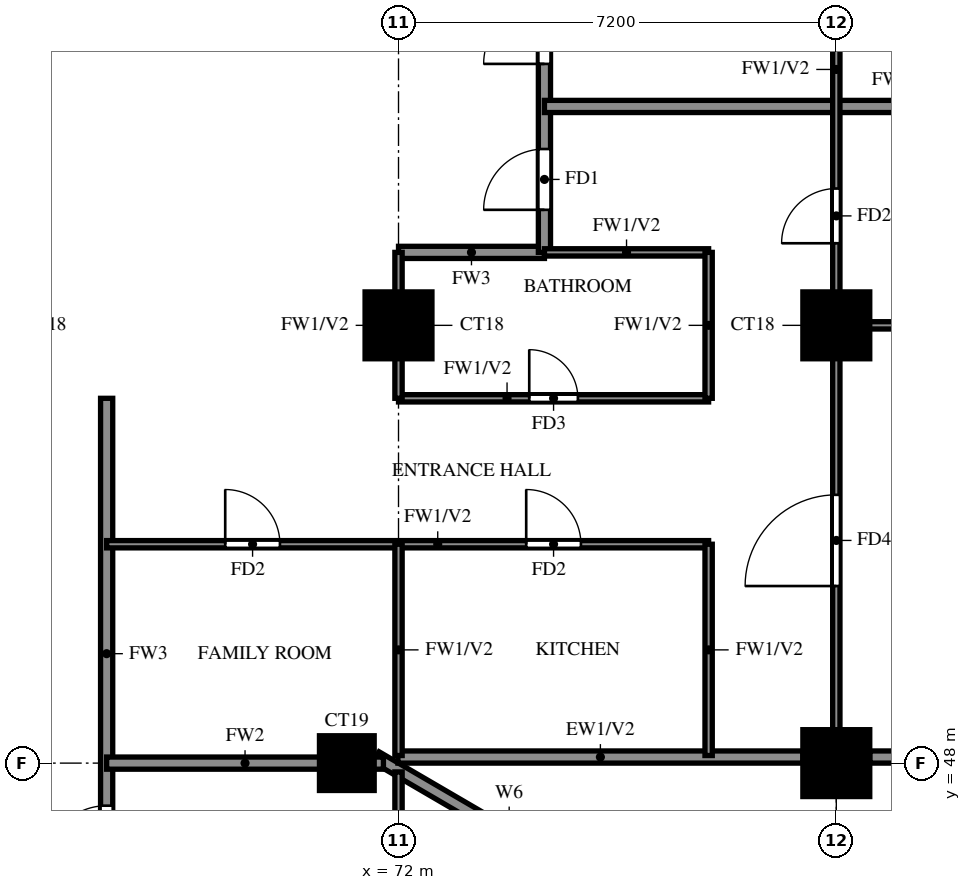
"""IFC4 building model, lengths in metres.
Left out: names, types, materials, properties, quantities, classifications, styles, units other than length and angle.
Written with IfcOpenShell. Run it as: python <this file> out.ifc"""

import sys

from ifc_helpers import new_model, si_unit, direction, frame, frame_2d, origin, origin_2d, place, context, subcontext, project, spatial, rectangle, extrude, source, transform, mapped, element, fill, save


model = new_model("IFC4")
c1 = context("Model", 3, precision=1e-05, world=origin(), true_north=direction((0.0, 1.0)))
c2 = subcontext(c1, "Body", "Model", "MODEL_VIEW")
j1 = project(units=[si_unit("LENGTHUNIT", "METRE"), si_unit("PLANEANGLEUNIT", "RADIAN")], contexts=[c1])
p1 = place(None, origin())
s1 = spatial("IfcSite", under=j1, at=p1, CompositionType="ELEMENT")
p2 = place(p1, origin())
s2 = spatial("IfcBuilding", under=s1, at=p2, CompositionType="ELEMENT")
p3 = place(p2, frame((0.0, 0.0, 123.5)))
s3 = spatial("IfcBuildingStorey", under=s2, at=p3, CompositionType="ELEMENT", Elevation=123.5)
m1 = source(origin(), c2, "Body", "SweptSolid", [
    extrude(rectangle(XDim=0.9, YDim=0.9, at=origin_2d()), origin(), (0.0, 0.0, 1.0), 3.2),
])
p4 = place(p3, frame((71.15, 48.0, 0.0), z_axis=(0.0, 0.0, 1.0), x_axis=(1.0, 0.0, 0.0)))
e1 = element("IfcColumn", 1, at=p4, inside=s3, PredefinedType="COLUMN", context=c2, shape_type="MappedRepresentation", body=[
    mapped(m1, transform((0.0, 0.0, 0.0))),
])
m2 = source(origin(), c2, "Body", "SweptSolid", [
    extrude(rectangle(XDim=1.1, YDim=1.1, at=origin_2d()), origin(), (0.0, 0.0, 1.0), 3.2),
])
for number, where, z_axis, x_axis in (
    (2, (79.2, 48.0, 0.0), (0.0, 0.0, 1.0), (1.0, 0.0, 0.0)),
    (3, (72.0, 55.2, 0.0), (0.0, 0.0, 1.0), (1.0, 0.0, 0.0)),
    (4, (79.2, 55.2, 0.0), (0.0, 0.0, 1.0), (1.0, 0.0, 0.0)),
):
    element("IfcColumn", number, at=place(p3, frame(where, z_axis=z_axis, x_axis=x_axis)), inside=s3, PredefinedType="COLUMN", context=c2, shape_type="MappedRepresentation", body=[
        mapped(m2, transform((0.0, 0.0, 0.0))),
    ])
p5 = place(p3, frame((85.719, 39.881, 0.0), z_axis=(0.0, 0.0, 1.0), x_axis=(-0.86377618652, 0.503875678716, 0.0)))
e5 = element("IfcWall", 5, at=p5, inside=s3, PredefinedType="SOLIDWALL", context=c2, shape_type="SweptSolid", body=[
    extrude(rectangle(XDim=16.311, YDim=0.2, at=frame_2d((8.156, 0.0))), origin(), (0.0, 0.0, 1.0), 3.2),
])
p6 = place(p5, frame((13.326, 0.0, 1.5)))
e6 = element("IfcOpeningElement", 6, at=p6, cuts=e5, PredefinedType="OPENING", context=c2, shape_type="SweptSolid", body=[
    extrude(rectangle(XDim=0.9, YDim=0.9, at=frame_2d((0.45, 0.45))), frame((0.0, 0.11, 0.0), z_axis=(0.0, -1.0, 0.0), x_axis=(1.0, 0.0, 0.0)), (0.0, 0.0, 1.0), 0.22),
])
p7 = place(p3, frame((71.99, 48.1, 0.0), z_axis=(0.0, 0.0, 1.0), x_axis=(1.0, 0.0, 0.0)))
e7 = element("IfcWall", 7, at=p7, inside=s3, PredefinedType="SOLIDWALL", context=c2, shape_type="SweptSolid", body=[
    extrude(rectangle(XDim=6.66, YDim=0.2, at=frame_2d((3.33, 0.0))), origin(), (0.0, 0.0, 1.0), 3.2),
])
p8 = place(p3, frame((79.75, 48.1, 0.0), z_axis=(0.0, 0.0, 1.0), x_axis=(1.0, 0.0, 0.0)))
e8 = element("IfcWall", 8, at=p8, inside=s3, PredefinedType="SOLIDWALL", context=c2, shape_type="SweptSolid", body=[
    extrude(rectangle(XDim=5.6, YDim=0.2, at=frame_2d((2.8, 0.0))), origin(), (0.0, 0.0, 1.0), 3.2),
])
p9 = place(p8, frame((1.6, 0.0, 0.6)))
e9 = element("IfcOpeningElement", 9, at=p9, cuts=e8, PredefinedType="OPENING", context=c2, shape_type="SweptSolid", body=[
    extrude(rectangle(XDim=2.4, YDim=2.4, at=frame_2d((1.2, 1.2))), frame((0.0, 0.11, 0.0), z_axis=(0.0, -1.0, 0.0), x_axis=(1.0, 0.0, 0.0)), (0.0, 0.0, 1.0), 0.22),
])
p10 = place(p3, frame((72.0, 56.4, 0.0), z_axis=(0.0, 0.0, 1.0), x_axis=(1.0, 0.0, 0.0)))
e10 = element("IfcWall", 10, at=p10, inside=s3, PredefinedType="SOLIDWALL", context=c2, shape_type="SweptSolid", body=[
    extrude(rectangle(XDim=2.4, YDim=0.2, at=frame_2d((1.2, 0.0))), origin(), (0.0, 0.0, 1.0), 3.2),
])
p11 = place(p3, frame((67.2, 45.6, 0.0), z_axis=(0.0, 0.0, 1.0), x_axis=(0.0, 1.0, 0.0)))
e11 = element("IfcWall", 11, at=p11, inside=s3, PredefinedType="SOLIDWALL", context=c2, shape_type="SweptSolid", body=[
    extrude(rectangle(XDim=8.4, YDim=0.2, at=frame_2d((4.2, 0.0))), origin(), (0.0, 0.0, 1.0), 3.2),
])
p12 = place(p11, frame((0.7, 0.0, 0.0)))
e12 = element("IfcOpeningElement", 12, at=p12, cuts=e11, PredefinedType="OPENING", context=c2, shape_type="SweptSolid", body=[
    extrude(rectangle(XDim=1.0, YDim=2.1, at=frame_2d((0.5, 1.05))), frame((0.0, 0.11, 0.0), z_axis=(0.0, -1.0, 0.0), x_axis=(1.0, 0.0, 0.0)), (0.0, 0.0, 1.0), 0.22),
])
p13 = place(p3, frame((74.4, 56.4, 0.0), z_axis=(0.0, 0.0, 1.0), x_axis=(0.0, 1.0, 0.0)))
e13 = element("IfcWall", 13, at=p13, inside=s3, PredefinedType="SOLIDWALL", context=c2, shape_type="SweptSolid", body=[
    extrude(rectangle(XDim=9.6, YDim=0.2, at=frame_2d((4.8, 0.0))), origin(), (0.0, 0.0, 1.0), 3.2),
])
p14 = place(p13, frame((0.7, 0.0, 0.0)))
e14 = element("IfcOpeningElement", 14, at=p14, cuts=e13, PredefinedType="OPENING", context=c2, shape_type="SweptSolid", body=[
    extrude(rectangle(XDim=1.0, YDim=2.1, at=frame_2d((0.5, 1.05))), frame((0.0, 0.11, 0.0), z_axis=(0.0, -1.0, 0.0), x_axis=(1.0, 0.0, 0.0)), (0.0, 0.0, 1.0), 0.22),
])
p15 = place(p13, frame((3.1, 0.0, 0.0)))
e15 = element("IfcOpeningElement", 15, at=p15, cuts=e13, PredefinedType="OPENING", context=c2, shape_type="SweptSolid", body=[
    extrude(rectangle(XDim=1.0, YDim=2.1, at=frame_2d((0.5, 1.05))), frame((0.0, 0.11, 0.0), z_axis=(0.0, -1.0, 0.0), x_axis=(1.0, 0.0, 0.0)), (0.0, 0.0, 1.0), 0.22),
])
p16 = place(p3, frame((67.2, 48.0, 0.0), z_axis=(0.0, 0.0, 1.0), x_axis=(1.0, 0.0, 0.0)))
e16 = element("IfcWall", 16, at=p16, inside=s3, PredefinedType="SOLIDWALL", context=c2, shape_type="SweptSolid", body=[
    extrude(rectangle(XDim=4.552, YDim=0.2, at=frame_2d((2.276, 0.0))), origin(), (0.0, 0.0, 1.0), 3.2),
])
p17 = place(p3, frame((74.4, 58.8, 0.0), z_axis=(0.0, 0.0, 1.0), x_axis=(1.0, 0.0, 0.0)))
e17 = element("IfcWall", 17, at=p17, inside=s3, PredefinedType="SOLIDWALL", context=c2, shape_type="SweptSolid", body=[
    extrude(rectangle(XDim=11.875, YDim=0.2, at=frame_2d((5.938, 0.0))), origin(), (0.0, 0.0, 1.0), 2.3),
])
p18 = place(p3, frame((67.2, 51.6, 0.0), z_axis=(0.0, 0.0, 1.0), x_axis=(1.0, 0.0, 0.0)))
e18 = element("IfcWall", 18, at=p18, inside=s3, PredefinedType="PARTITIONING", context=c2, shape_type="SweptSolid", body=[
    extrude(rectangle(XDim=9.9, YDim=0.12, at=frame_2d((4.95, 0.0))), origin(), (0.0, 0.0, 1.0), 3.2),
])
p19 = place(p18, frame((6.9, 0.0, 0.0)))
e19 = element("IfcOpeningElement", 19, at=p19, cuts=e18, PredefinedType="OPENING", context=c2, shape_type="SweptSolid", body=[
    extrude(rectangle(XDim=0.9, YDim=2.1, at=frame_2d((0.45, 1.05))), frame((0.0, 0.07, 0.0), z_axis=(0.0, -1.0, 0.0), x_axis=(1.0, 0.0, 0.0)), (0.0, 0.0, 1.0), 0.14),
])
p20 = place(p18, frame((1.95, 0.0, 0.0)))
e20 = element("IfcOpeningElement", 20, at=p20, cuts=e18, PredefinedType="OPENING", context=c2, shape_type="SweptSolid", body=[
    extrude(rectangle(XDim=0.9, YDim=2.1, at=frame_2d((0.45, 1.05))), frame((0.0, 0.07, 0.0), z_axis=(0.0, -1.0, 0.0), x_axis=(1.0, 0.0, 0.0)), (0.0, 0.0, 1.0), 0.14),
])
p21 = place(p3, frame((72.0, 54.0, 0.0), z_axis=(0.0, 0.0, 1.0), x_axis=(1.0, 0.0, 0.0)))
e21 = element("IfcWall", 21, at=p21, inside=s3, PredefinedType="PARTITIONING", context=c2, shape_type="SweptSolid", body=[
    extrude(rectangle(XDim=5.1, YDim=0.12, at=frame_2d((2.55, 0.0))), origin(), (0.0, 0.0, 1.0), 3.2),
])
p22 = place(p21, frame((2.15, 0.0, 0.0)))
e22 = element("IfcOpeningElement", 22, at=p22, cuts=e21, PredefinedType="OPENING", context=c2, shape_type="SweptSolid", body=[
    extrude(rectangle(XDim=0.8, YDim=2.1, at=frame_2d((0.4, 1.05))), frame((0.0, 0.07, 0.0), z_axis=(0.0, -1.0, 0.0), x_axis=(1.0, 0.0, 0.0)), (0.0, 0.0, 1.0), 0.14),
])
p23 = place(p3, frame((79.2, 55.2, 0.0), z_axis=(0.0, 0.0, 1.0), x_axis=(1.0, 0.0, 0.0)))
e23 = element("IfcWall", 23, at=p23, inside=s3, PredefinedType="PARTITIONING", context=c2, shape_type="SweptSolid", body=[
    extrude(rectangle(XDim=7.075, YDim=0.12, at=frame_2d((3.538, 0.0))), origin(), (0.0, 0.0, 1.0), 3.2),
])
p24 = place(p3, frame((74.4, 56.4, 0.0), z_axis=(0.0, 0.0, 1.0), x_axis=(1.0, 0.0, 0.0)))
e24 = element("IfcWall", 24, at=p24, inside=s3, PredefinedType="PARTITIONING", context=c2, shape_type="SweptSolid", body=[
    extrude(rectangle(XDim=2.7, YDim=0.12, at=frame_2d((1.35, 0.0))), origin(), (0.0, 0.0, 1.0), 3.2),
])
p25 = place(p3, frame((72.0, 39.725, 0.0), z_axis=(0.0, 0.0, 1.0), x_axis=(0.0, 1.0, 0.0)))
e25 = element("IfcWall", 25, at=p25, inside=s3, PredefinedType="PARTITIONING", context=c2, shape_type="SweptSolid", body=[
    extrude(rectangle(XDim=8.13, YDim=0.12, at=frame_2d((4.065, 0.0))), origin(), (0.0, 0.0, 1.0), 2.3),
])
p26 = place(p25, frame((1.788, 0.0, 0.0)))
e26 = element("IfcOpeningElement", 26, at=p26, cuts=e25, PredefinedType="OPENING", context=c2, shape_type="SweptSolid", body=[
    extrude(rectangle(XDim=0.9, YDim=2.1, at=frame_2d((0.45, 1.05))), frame((0.0, 0.07, 0.0), z_axis=(0.0, -1.0, 0.0), x_axis=(1.0, 0.0, 0.0)), (0.0, 0.0, 1.0), 0.14),
])
p27 = place(p25, frame((4.575, 0.0, 0.0)))
e27 = element("IfcOpeningElement", 27, at=p27, cuts=e25, PredefinedType="OPENING", context=c2, shape_type="SweptSolid", body=[
    extrude(rectangle(XDim=0.8, YDim=2.1, at=frame_2d((0.4, 1.05))), frame((0.0, 0.07, 0.0), z_axis=(0.0, -1.0, 0.0), x_axis=(1.0, 0.0, 0.0)), (0.0, 0.0, 1.0), 0.14),
])
p28 = place(p3, frame((72.0, 48.125, 0.0), z_axis=(0.0, 0.0, 1.0), x_axis=(0.0, 1.0, 0.0)))
e28 = element("IfcWall", 28, at=p28, inside=s3, PredefinedType="PARTITIONING", context=c2, shape_type="SweptSolid", body=[
    extrude(rectangle(XDim=3.475, YDim=0.12, at=frame_2d((1.738, 0.0))), origin(), (0.0, 0.0, 1.0), 3.2),
])
p29 = place(p3, frame((72.0, 54.0, 0.0), z_axis=(0.0, 0.0, 1.0), x_axis=(0.0, 1.0, 0.0)))
e29 = element("IfcWall", 29, at=p29, inside=s3, PredefinedType="PARTITIONING", context=c2, shape_type="SweptSolid", body=[
    extrude(rectangle(XDim=2.4, YDim=0.12, at=frame_2d((1.2, 0.0))), origin(), (0.0, 0.0, 1.0), 3.2),
])
p30 = place(p3, frame((77.1, 48.125, 0.0), z_axis=(0.0, 0.0, 1.0), x_axis=(0.0, 1.0, 0.0)))
e30 = element("IfcWall", 30, at=p30, inside=s3, PredefinedType="PARTITIONING", context=c2, shape_type="SweptSolid", body=[
    extrude(rectangle(XDim=3.475, YDim=0.12, at=frame_2d((1.738, 0.0))), origin(), (0.0, 0.0, 1.0), 3.2),
])
p31 = place(p3, frame((77.1, 54.0, 0.0), z_axis=(0.0, 0.0, 1.0), x_axis=(0.0, 1.0, 0.0)))
e31 = element("IfcWall", 31, at=p31, inside=s3, PredefinedType="PARTITIONING", context=c2, shape_type="SweptSolid", body=[
    extrude(rectangle(XDim=2.4, YDim=0.12, at=frame_2d((1.2, 0.0))), origin(), (0.0, 0.0, 1.0), 3.2),
])
p32 = place(p3, frame((79.2, 48.125, 0.0), z_axis=(0.0, 0.0, 1.0), x_axis=(0.0, 1.0, 0.0)))
e32 = element("IfcWall", 32, at=p32, inside=s3, PredefinedType="PARTITIONING", context=c2, shape_type="SweptSolid", body=[
    extrude(rectangle(XDim=25.075, YDim=0.12, at=frame_2d((12.538, 0.0))), origin(), (0.0, 0.0, 1.0), 3.2),
])
p33 = place(p32, frame((2.788, 0.0, 0.0)))
e33 = element("IfcOpeningElement", 33, at=p33, cuts=e32, PredefinedType="OPENING", context=c2, shape_type="SweptSolid", body=[
    extrude(rectangle(XDim=1.5, YDim=2.1, at=frame_2d((0.75, 1.05))), frame((0.0, 0.07, 0.0), z_axis=(0.0, -1.0, 0.0), x_axis=(1.0, 0.0, 0.0)), (0.0, 0.0, 1.0), 0.14),
])
p34 = place(p32, frame((8.425, 0.0, 0.0)))
e34 = element("IfcOpeningElement", 34, at=p34, cuts=e32, PredefinedType="OPENING", context=c2, shape_type="SweptSolid", body=[
    extrude(rectangle(XDim=0.9, YDim=2.1, at=frame_2d((0.45, 1.05))), frame((0.0, 0.07, 0.0), z_axis=(0.0, -1.0, 0.0), x_axis=(1.0, 0.0, 0.0)), (0.0, 0.0, 1.0), 0.14),
])
p35 = place(p32, frame((12.025, 0.0, 0.0)))
e35 = element("IfcOpeningElement", 35, at=p35, cuts=e32, PredefinedType="OPENING", context=c2, shape_type="SweptSolid", body=[
    extrude(rectangle(XDim=0.9, YDim=2.1, at=frame_2d((0.45, 1.05))), frame((0.0, 0.07, 0.0), z_axis=(0.0, -1.0, 0.0), x_axis=(1.0, 0.0, 0.0)), (0.0, 0.0, 1.0), 0.14),
])
p36 = place(p32, frame((15.625, 0.0, 0.0)))
e36 = element("IfcOpeningElement", 36, at=p36, cuts=e32, PredefinedType="OPENING", context=c2, shape_type="SweptSolid", body=[
    extrude(rectangle(XDim=0.9, YDim=2.1, at=frame_2d((0.45, 1.05))), frame((0.0, 0.07, 0.0), z_axis=(0.0, -1.0, 0.0), x_axis=(1.0, 0.0, 0.0)), (0.0, 0.0, 1.0), 0.14),
])
p37 = place(p32, frame((19.225, 0.0, 0.0)))
e37 = element("IfcOpeningElement", 37, at=p37, cuts=e32, PredefinedType="OPENING", context=c2, shape_type="SweptSolid", body=[
    extrude(rectangle(XDim=0.9, YDim=2.1, at=frame_2d((0.45, 1.05))), frame((0.0, 0.07, 0.0), z_axis=(0.0, -1.0, 0.0), x_axis=(1.0, 0.0, 0.0)), (0.0, 0.0, 1.0), 0.14),
])
p38 = place(p32, frame((22.825, 0.0, 0.0)))
e38 = element("IfcOpeningElement", 38, at=p38, cuts=e32, PredefinedType="OPENING", context=c2, shape_type="SweptSolid", body=[
    extrude(rectangle(XDim=0.9, YDim=2.1, at=frame_2d((0.45, 1.05))), frame((0.0, 0.07, 0.0), z_axis=(0.0, -1.0, 0.0), x_axis=(1.0, 0.0, 0.0)), (0.0, 0.0, 1.0), 0.14),
])
p39 = place(p14, origin())
e39 = element("IfcDoor", 39, at=p39, inside=s3, OperationType="SINGLE_SWING_LEFT", PredefinedType="DOOR", context=c2, shape_type="SweptSolid", body=[
    extrude(rectangle(XDim=1.0, YDim=2.1, at=frame_2d((0.5, 1.05))), frame((0.0, 0.025, 0.0), z_axis=(0.0, -1.0, 0.0), x_axis=(1.0, 0.0, 0.0)), (0.0, 0.0, 1.0), 0.05),
])
fill(e14, e39)
p40 = place(p33, origin())
e40 = element("IfcDoor", 40, at=p40, inside=s3, OperationType="SINGLE_SWING_RIGHT", PredefinedType="DOOR", context=c2, shape_type="SweptSolid", body=[
    extrude(rectangle(XDim=1.5, YDim=2.1, at=frame_2d((0.75, 1.05))), frame((0.0, 0.025, 0.0), z_axis=(0.0, -1.0, 0.0), x_axis=(1.0, 0.0, 0.0)), (0.0, 0.0, 1.0), 0.05),
])
fill(e33, e40)
p41 = place(p34, origin())
e41 = element("IfcDoor", 41, at=p41, inside=s3, OperationType="SINGLE_SWING_LEFT", PredefinedType="DOOR", context=c2, shape_type="SweptSolid", body=[
    extrude(rectangle(XDim=0.9, YDim=2.1, at=frame_2d((0.45, 1.05))), frame((0.0, 0.025, 0.0), z_axis=(0.0, -1.0, 0.0), x_axis=(1.0, 0.0, 0.0)), (0.0, 0.0, 1.0), 0.05),
])
fill(e34, e41)
p42 = place(p19, origin())
e42 = element("IfcDoor", 42, at=p42, inside=s3, OperationType="SINGLE_SWING_LEFT", PredefinedType="DOOR", context=c2, shape_type="SweptSolid", body=[
    extrude(rectangle(XDim=0.9, YDim=2.1, at=frame_2d((0.45, 1.05))), frame((0.0, 0.025, 0.0), z_axis=(0.0, -1.0, 0.0), x_axis=(1.0, 0.0, 0.0)), (0.0, 0.0, 1.0), 0.05),
])
fill(e19, e42)
p43 = place(p22, origin())
e43 = element("IfcDoor", 43, at=p43, inside=s3, OperationType="SINGLE_SWING_RIGHT", PredefinedType="DOOR", context=c2, shape_type="SweptSolid", body=[
    extrude(rectangle(XDim=0.8, YDim=2.1, at=frame_2d((0.4, 1.05))), frame((0.0, 0.025, 0.0), z_axis=(0.0, -1.0, 0.0), x_axis=(1.0, 0.0, 0.0)), (0.0, 0.0, 1.0), 0.05),
])
fill(e22, e43)
p44 = place(p20, origin())
e44 = element("IfcDoor", 44, at=p44, inside=s3, OperationType="SINGLE_SWING_LEFT", PredefinedType="DOOR", context=c2, shape_type="SweptSolid", body=[
    extrude(rectangle(XDim=0.9, YDim=2.1, at=frame_2d((0.45, 1.05))), frame((0.0, 0.025, 0.0), z_axis=(0.0, -1.0, 0.0), x_axis=(1.0, 0.0, 0.0)), (0.0, 0.0, 1.0), 0.05),
])
fill(e20, e44)
p45 = place(p15, origin())
e45 = element("IfcDoor", 45, at=p45, inside=s3, OperationType="SINGLE_SWING_RIGHT", PredefinedType="DOOR", context=c2, shape_type="SweptSolid", body=[
    extrude(rectangle(XDim=1.0, YDim=2.1, at=frame_2d((0.5, 1.05))), frame((0.0, 0.025, 0.0), z_axis=(0.0, -1.0, 0.0), x_axis=(1.0, 0.0, 0.0)), (0.0, 0.0, 1.0), 0.05),
])
fill(e15, e45)
p46 = place(p12, origin())
e46 = element("IfcDoor", 46, at=p46, inside=s3, OperationType="SINGLE_SWING_LEFT", PredefinedType="DOOR", context=c2, shape_type="SweptSolid", body=[
    extrude(rectangle(XDim=1.0, YDim=2.1, at=frame_2d((0.5, 1.05))), frame((0.0, 0.025, 0.0), z_axis=(0.0, -1.0, 0.0), x_axis=(1.0, 0.0, 0.0)), (0.0, 0.0, 1.0), 0.05),
])
fill(e12, e46)
save(model, sys.argv[1])
